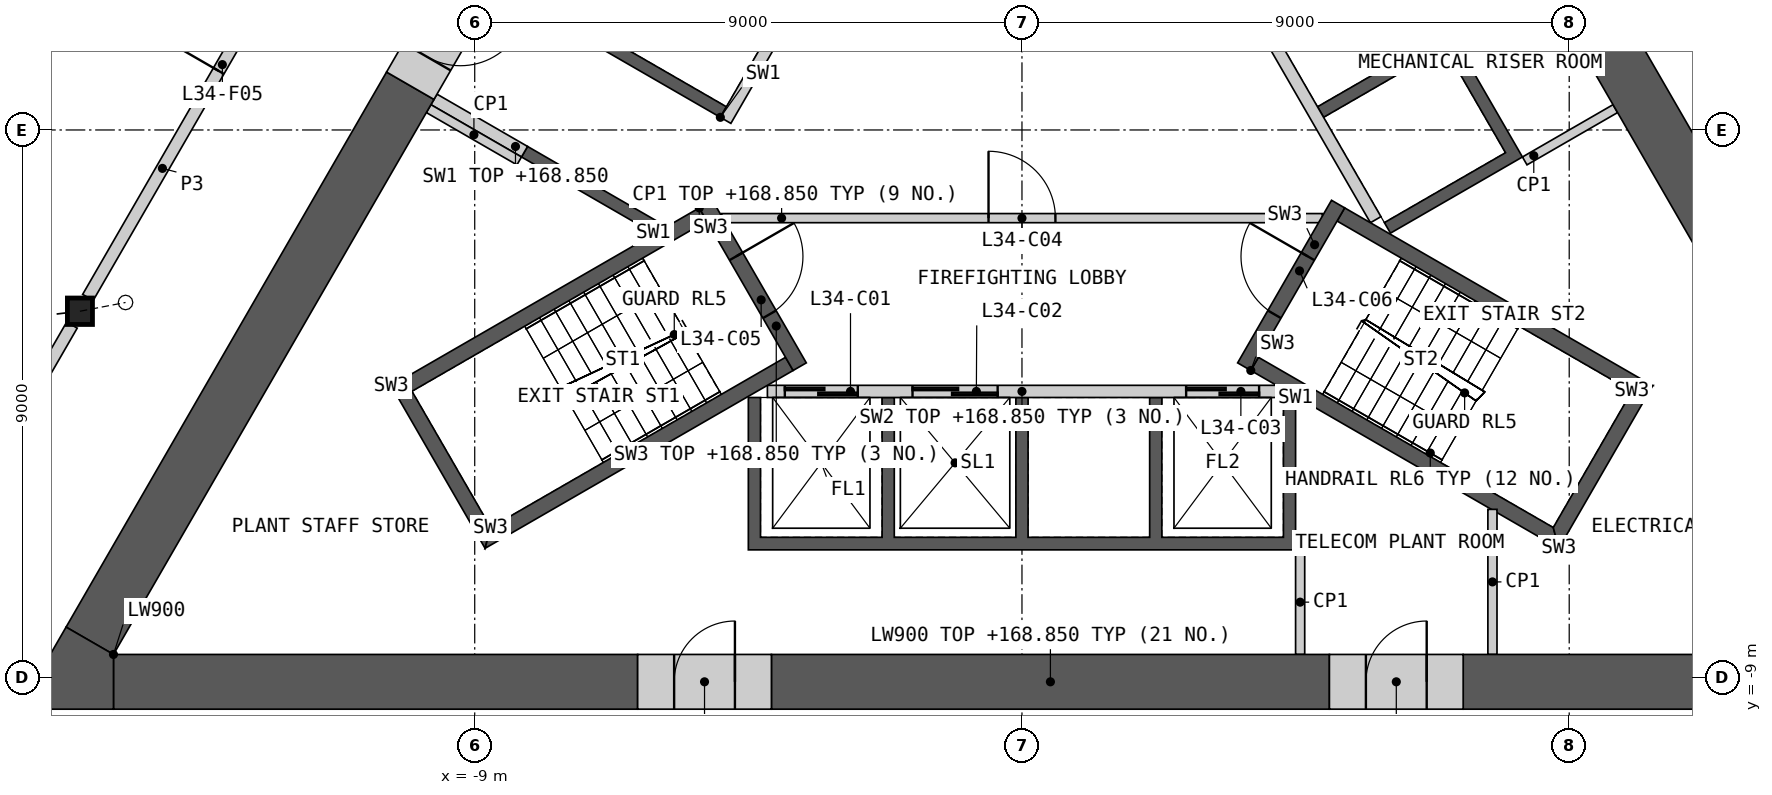
"""IFC4 building model, lengths in metres.
Left out: names, types, materials, properties, quantities, classifications, styles, units other than length and angle.
Written with IfcOpenShell. Run it as: python <this file> out.ifc"""

import sys

from ifc_helpers import new_model, si_unit, direction, frame, frame_2d, origin, origin_2d, place, context, subcontext, project, spatial, polyline, rectangle, i_section, outline, extrude, element, fill, save


model = new_model("IFC4")
c1 = context("Model", 3, precision=1e-05, world=origin(), true_north=direction((0.0, 1.0)))
c2 = subcontext(c1, "Body", "Model", "MODEL_VIEW")
j1 = project(units=[si_unit("LENGTHUNIT", "METRE"), si_unit("PLANEANGLEUNIT", "RADIAN")], contexts=[c1])
p1 = place(None, origin())
s1 = spatial("IfcSite", under=j1, at=p1, CompositionType="ELEMENT")
p2 = place(p1, origin())
s2 = spatial("IfcBuilding", under=s1, at=p2, CompositionType="ELEMENT")
p3 = place(p2, frame((0.0, 0.0, 164.2)))
s3 = spatial("IfcBuildingStorey", under=s2, at=p3, CompositionType="ELEMENT", Elevation=164.2)
p4 = place(p3, frame((-15.493, -2.982, 0.0), z_axis=(0.148279879283, 0.028574768404, 0.988532528555), x_axis=(-0.189226752312, 0.981933417401, 0.0)))
e1 = element("IfcColumn", 1, at=p4, inside=s3, PredefinedType="COLUMN", context=c2, shape_type="SweptSolid", body=[
    extrude(i_section(OverallWidth=0.412, OverallDepth=0.435, WebThickness=0.036, FlangeThickness=0.057, at=origin_2d()), frame((0.0, 0.0, 0.033)), (0.0, 0.0, 1.0), 4.992),
])
p5 = place(p3, origin())
e2 = element("IfcWall", 2, at=p5, inside=s3, PredefinedType="SHEAR", context=c2, shape_type="SweptSolid", body=[
    extrude(outline(polyline([(4.5, -4.4), (4.5, -6.906), (-4.5, -6.906), (-4.5, -4.4), (-4.3, -4.4), (-4.3, -6.7), (-2.3, -6.7), (-2.3, -4.4), (-2.1, -4.4), (-2.1, -6.7), (-0.1, -6.7), (-0.1, -4.4), (0.1, -4.4), (0.1, -6.7), (2.1, -6.7), (2.1, -4.4), (2.3, -4.4), (2.3, -6.7), (4.3, -6.7), (4.3, -4.4), (4.5, -4.4)])), origin(), (0.0, 0.0, 1.0), 4.65),
])
p6 = place(p3, frame((-4.187, -4.3, 0.0), z_axis=(0.0, 0.0, 1.0), x_axis=(1.0, 0.0, 0.0)))
e3 = element("IfcWall", 3, at=p6, inside=s3, PredefinedType="SOLIDWALL", context=c2, shape_type="SweptSolid", body=[
    extrude(rectangle(XDim=8.373, YDim=0.2, at=frame_2d((4.187, 0.0))), origin(), (0.0, 0.0, 1.0), 4.65),
])
p7 = place(p6, frame((0.287, 0.0, 0.0)))
e4 = element("IfcOpeningElement", 4, at=p7, cuts=e3, PredefinedType="OPENING", context=c2, shape_type="SweptSolid", body=[
    extrude(rectangle(XDim=1.2, YDim=2.1, at=frame_2d((0.6, 1.05))), frame((0.0, 0.11, 0.0), z_axis=(0.0, -1.0, 0.0), x_axis=(1.0, 0.0, 0.0)), (0.0, 0.0, 1.0), 0.22),
])
p8 = place(p6, frame((2.387, 0.0, 0.0)))
e5 = element("IfcOpeningElement", 5, at=p8, cuts=e3, PredefinedType="OPENING", context=c2, shape_type="SweptSolid", body=[
    extrude(rectangle(XDim=1.4, YDim=2.1, at=frame_2d((0.7, 1.05))), frame((0.0, 0.11, 0.0), z_axis=(0.0, -1.0, 0.0), x_axis=(1.0, 0.0, 0.0)), (0.0, 0.0, 1.0), 0.22),
])
p9 = place(p6, frame((6.887, 0.0, 0.0)))
e6 = element("IfcOpeningElement", 6, at=p9, cuts=e3, PredefinedType="OPENING", context=c2, shape_type="SweptSolid", body=[
    extrude(rectangle(XDim=1.2, YDim=2.1, at=frame_2d((0.6, 1.05))), frame((0.0, 0.11, 0.0), z_axis=(0.0, -1.0, 0.0), x_axis=(1.0, 0.0, 0.0)), (0.0, 0.0, 1.0), 0.22),
])
p10 = place(p3, origin())
e7 = element("IfcWall", 7, at=p10, inside=s3, PredefinedType="SHEAR", context=c2, shape_type="SweptSolid", body=[
    extrude(outline(polyline([(1.561, 6.097), (3.731, 7.35), (8.231, -0.444), (6.061, -1.697), (5.96, -1.524), (7.952, -0.374), (6.952, 1.358), (4.96, 0.208), (4.861, 0.381), (6.852, 1.531), (5.852, 3.263), (3.861, 2.113), (3.76, 2.287), (5.752, 3.437), (4.752, 5.169), (2.76, 4.019), (2.66, 4.192), (4.652, 5.342), (3.652, 7.074), (1.66, 5.924), (1.561, 6.097)])), origin(), (0.0, 0.0, 1.0), 4.65),
])
p11 = place(p3, frame((5.817, -1.476, 0.0), z_axis=(0.0, 0.0, 1.0), x_axis=(-0.500002616675, 0.866023893041, 0.0)))
e8 = element("IfcWall", 8, at=p11, inside=s3, PredefinedType="SOLIDWALL", context=c2, shape_type="SweptSolid", body=[
    extrude(rectangle(XDim=8.373, YDim=0.2, at=frame_2d((4.187, 0.0))), origin(), (0.0, 0.0, 1.0), 4.65),
])
p12 = place(p3, origin())
e9 = element("IfcWall", 9, at=p12, inside=s3, PredefinedType="SHEAR", context=c2, shape_type="SweptSolid", body=[
    extrude(outline(polyline([(-6.061, -1.697), (-8.231, -0.444), (-8.131, -0.271), (-5.96, -1.524), (-6.061, -1.697)])), origin(), (0.0, 0.0, 1.0), 4.65),
])
p13 = place(p3, origin())
e10 = element("IfcWall", 10, at=p13, inside=s3, PredefinedType="SHEAR", context=c2, shape_type="SweptSolid", body=[
    extrude(outline(polyline([(-4.96, 0.208), (-7.131, 1.461), (-3.731, 7.35), (-1.561, 6.097), (-1.66, 5.924), (-3.652, 7.074), (-4.652, 5.342), (-2.66, 4.192), (-2.76, 4.019), (-4.752, 5.169), (-5.752, 3.437), (-3.76, 2.287), (-3.861, 2.113), (-5.852, 3.263), (-6.852, 1.531), (-4.861, 0.381), (-4.96, 0.208)])), origin(), (0.0, 0.0, 1.0), 4.65),
])
p14 = place(p3, frame((-1.631, 5.776, 0.0), z_axis=(0.0, 0.0, 1.0), x_axis=(-0.499992876559, -0.866029516466, 0.0)))
e11 = element("IfcWall", 11, at=p14, inside=s3, PredefinedType="SOLIDWALL", context=c2, shape_type="SweptSolid", body=[
    extrude(rectangle(XDim=6.486, YDim=0.2, at=frame_2d((3.243, 0.0))), origin(), (0.0, 0.0, 1.0), 4.65),
])
p15 = place(p3, frame((-8.181, -0.357, 0.0), z_axis=(0.0, 0.0, 1.0), x_axis=(-0.866024871741, 0.500000921525, 0.0)))
e12 = element("IfcWall", 12, at=p15, inside=s3, PredefinedType="SHEAR", context=c2, shape_type="SweptSolid", body=[
    extrude(rectangle(XDim=1.72, YDim=0.2, at=frame_2d((0.86, 0.0))), origin(), (0.0, 0.0, 1.0), 4.65),
])
p16 = place(p3, frame((-4.941, -1.45, 0.0), z_axis=(0.0, 0.0, 1.0), x_axis=(1.0, 0.0, 0.0)))
e13 = element("IfcWall", 13, at=p16, inside=s3, PredefinedType="PARTITIONING", context=c2, shape_type="SweptSolid", body=[
    extrude(rectangle(XDim=9.882, YDim=0.15, at=frame_2d((4.941, 0.0))), origin(), (0.0, 0.0, 1.0), 4.65),
])
p17 = place(p16, frame((4.391, 0.0, 0.0)))
e14 = element("IfcOpeningElement", 14, at=p17, cuts=e13, PredefinedType="OPENING", context=c2, shape_type="SweptSolid", body=[
    extrude(rectangle(XDim=1.1, YDim=2.1, at=frame_2d((0.55, 1.05))), frame((0.0, 0.085, 0.0), z_axis=(0.0, -1.0, 0.0), x_axis=(1.0, 0.0, 0.0)), (0.0, 0.0, 1.0), 0.17),
])
p18 = place(p3, origin())
e15 = element("IfcWall", 15, at=p18, inside=s3, PredefinedType="SHEAR", context=c2, shape_type="SweptSolid", body=[
    extrude(outline(polyline([(-5.307, -1.281), (-10.374, -4.206), (-10.032, -4.298), (-5.182, -1.498), (-5.307, -1.281)])), origin(), (0.0, 0.0, 1.0), 4.65),
])
p19 = place(p3, origin())
e16 = element("IfcWall", 16, at=p19, inside=s3, PredefinedType="SHEAR", context=c2, shape_type="SweptSolid", body=[
    extrude(outline(polyline([(-10.374, -4.206), (-8.83, -6.881), (-8.738, -6.539), (-10.032, -4.298), (-10.374, -4.206)])), origin(), (0.0, 0.0, 1.0), 4.65),
])
p20 = place(p3, origin())
e17 = element("IfcWall", 17, at=p20, inside=s3, PredefinedType="SHEAR", context=c2, shape_type="SweptSolid", body=[
    extrude(outline(polyline([(-8.738, -6.539), (-8.83, -6.881), (-3.763, -3.956), (-3.888, -3.739), (-8.738, -6.539)])), origin(), (0.0, 0.0, 1.0), 4.65),
])
p21 = place(p3, frame((-5.199, -1.219, 0.0), z_axis=(0.0, 0.0, 1.0), x_axis=(0.499982516597, -0.866035497597, 0.0)))
e18 = element("IfcWall", 18, at=p21, inside=s3, PredefinedType="SHEAR", context=c2, shape_type="SweptSolid", body=[
    extrude(rectangle(XDim=3.088, YDim=0.25, at=frame_2d((1.544, 0.0))), origin(), (0.0, 0.0, 1.0), 4.65),
])
p22 = place(p21, frame((0.994, 0.0, 0.0)))
e19 = element("IfcOpeningElement", 19, at=p22, cuts=e18, PredefinedType="OPENING", context=c2, shape_type="SweptSolid", body=[
    extrude(rectangle(XDim=1.1, YDim=2.1, at=frame_2d((0.55, 1.05))), frame((0.0, 0.135, 0.0), z_axis=(0.0, -1.0, 0.0), x_axis=(1.0, 0.0, 0.0)), (0.0, 0.0, 1.0), 0.27),
])
p23 = place(p3, origin())
e20 = element("IfcWall", 20, at=p23, inside=s3, PredefinedType="SHEAR", context=c2, shape_type="SweptSolid", body=[
    extrude(outline(polyline([(3.763, -3.956), (8.83, -6.881), (8.738, -6.539), (3.888, -3.739), (3.763, -3.956)])), origin(), (0.0, 0.0, 1.0), 4.65),
])
p24 = place(p3, origin())
e21 = element("IfcWall", 21, at=p24, inside=s3, PredefinedType="SHEAR", context=c2, shape_type="SweptSolid", body=[
    extrude(outline(polyline([(8.83, -6.881), (10.374, -4.206), (10.032, -4.298), (8.738, -6.539), (8.83, -6.881)])), origin(), (0.0, 0.0, 1.0), 4.65),
])
p25 = place(p3, origin())
e22 = element("IfcWall", 22, at=p25, inside=s3, PredefinedType="SHEAR", context=c2, shape_type="SweptSolid", body=[
    extrude(outline(polyline([(10.032, -4.298), (10.374, -4.206), (5.307, -1.281), (5.182, -1.498), (10.032, -4.298)])), origin(), (0.0, 0.0, 1.0), 4.65),
])
p26 = place(p3, frame((3.655, -3.893, 0.0), z_axis=(0.0, 0.0, 1.0), x_axis=(0.499982516597, 0.866035497597, 0.0)))
e23 = element("IfcWall", 23, at=p26, inside=s3, PredefinedType="SHEAR", context=c2, shape_type="SweptSolid", body=[
    extrude(rectangle(XDim=3.088, YDim=0.25, at=frame_2d((1.544, 0.0))), origin(), (0.0, 0.0, 1.0), 4.65),
])
p27 = place(p26, frame((0.994, 0.0, 0.0)))
e24 = element("IfcOpeningElement", 24, at=p27, cuts=e23, PredefinedType="OPENING", context=c2, shape_type="SweptSolid", body=[
    extrude(rectangle(XDim=1.1, YDim=2.1, at=frame_2d((0.55, 1.05))), frame((0.0, 0.135, 0.0), z_axis=(0.0, -1.0, 0.0), x_axis=(1.0, 0.0, 0.0)), (0.0, 0.0, 1.0), 0.27),
])
for number, where, z_axis, x_axis in (
    (25, (-8.268, -0.509, 0.0), (0.0, 0.0, 1.0), (-0.866, 0.5, 0.0)),
    (26, (4.575, -6.906, 0.0), (0.0, 0.0, 1.0), (0.0, -1.0, 0.0)),
    (27, (8.268, -0.509, 0.0), (0.0, 0.0, 1.0), (0.866, 0.5, 0.0)),
):
    element("IfcWall", number, at=place(p3, frame(where, z_axis=z_axis, x_axis=x_axis)), inside=s3, PredefinedType="PARTITIONING", context=c2, shape_type="SweptSolid", body=[
        extrude(rectangle(XDim=1.72, YDim=0.15, at=frame_2d((0.86, 0.0))), origin(), (0.0, 0.0, 1.0), 4.65),
    ])
p28 = place(p3, frame((7.737, -8.626, 0.0), z_axis=(0.0, 0.0, 1.0), x_axis=(0.0, 1.0, 0.0)))
e28 = element("IfcWall", 28, at=p28, inside=s3, PredefinedType="PARTITIONING", context=c2, shape_type="SweptSolid", body=[
    extrude(rectangle(XDim=2.386, YDim=0.15, at=frame_2d((1.193, 0.0))), origin(), (0.0, 0.0, 1.0), 4.65),
])
p29 = place(p3, frame((-4.121, -9.076, 0.0), z_axis=(0.0, 0.0, 1.0), x_axis=(1.0, 0.0, 0.0)))
e29 = element("IfcWall", 29, at=p29, inside=s3, PredefinedType="SHEAR", context=c2, shape_type="SweptSolid", body=[
    extrude(rectangle(XDim=9.177, YDim=0.9, at=frame_2d((4.588, 0.0))), origin(), (0.0, 0.0, 1.0), 4.65),
])
p30 = place(p3, frame((-14.941, -9.076, 0.0), z_axis=(0.0, 0.0, 1.0), x_axis=(1.0, 0.0, 0.0)))
e30 = element("IfcWall", 30, at=p30, inside=s3, PredefinedType="SHEAR", context=c2, shape_type="SweptSolid", body=[
    extrude(rectangle(XDim=8.621, YDim=0.9, at=frame_2d((4.31, 0.0))), origin(), (0.0, 0.0, 1.0), 4.65),
])
p31 = place(p3, frame((7.256, -9.076, 0.0), z_axis=(0.0, 0.0, 1.0), x_axis=(1.0, 0.0, 0.0)))
e31 = element("IfcWall", 31, at=p31, inside=s3, PredefinedType="SHEAR", context=c2, shape_type="SweptSolid", body=[
    extrude(rectangle(XDim=7.685, YDim=0.9, at=frame_2d((3.843, 0.0))), origin(), (0.0, 0.0, 1.0), 4.65),
])
p32 = place(p3, frame((12.208, -2.992, 0.0), z_axis=(0.0, 0.0, 1.0), x_axis=(-0.499993658486, 0.866029065029, 0.0)))
e32 = element("IfcWall", 32, at=p32, inside=s3, PredefinedType="SHEAR", context=c2, shape_type="SweptSolid", body=[
    extrude(rectangle(XDim=5.974, YDim=0.9, at=frame_2d((2.987, 0.0))), origin(), (0.0, 0.0, 1.0), 4.65),
])
p33 = place(p3, frame((-10.06, 0.728, 0.0), z_axis=(0.0, 0.0, 1.0), x_axis=(-0.499995114243, -0.866028224559, 0.0)))
e33 = element("IfcWall", 33, at=p33, inside=s3, PredefinedType="SHEAR", context=c2, shape_type="SweptSolid", body=[
    extrude(rectangle(XDim=10.541, YDim=0.9, at=frame_2d((5.271, 0.0))), origin(), (0.0, 0.0, 1.0), 4.65),
])
p34 = place(p3, origin())
e34 = element("IfcWall", 34, at=p34, inside=s3, PredefinedType="SHEAR", context=c2, shape_type="SweptSolid", body=[
    extrude(outline(polyline([(-14.941, -8.626), (-14.941, -9.526), (-16.5, -9.526), (-15.721, -8.176), (-14.941, -8.626)])), origin(), (0.0, 0.0, 1.0), 4.65),
])
p35 = place(p3, frame((5.056, -9.076, 0.0), z_axis=(0.0, 0.0, 1.0), x_axis=(1.0, 0.0, 0.0)))
e35 = element("IfcWall", 35, at=p35, inside=s3, PredefinedType="SHEAR", context=c2, shape_type="SweptSolid", body=[
    extrude(rectangle(XDim=2.2, YDim=0.9, at=frame_2d((1.1, 0.0))), origin(), (0.0, 0.0, 1.0), 4.65),
])
p36 = place(p35, frame((0.6, 0.0, 0.0)))
e36 = element("IfcOpeningElement", 36, at=p36, cuts=e35, PredefinedType="OPENING", context=c2, shape_type="SweptSolid", body=[
    extrude(rectangle(XDim=1.0, YDim=2.1, at=frame_2d((0.5, 1.05))), frame((0.0, 0.46, 0.0), z_axis=(0.0, -1.0, 0.0), x_axis=(1.0, 0.0, 0.0)), (0.0, 0.0, 1.0), 0.92),
])
p37 = place(p3, frame((-6.321, -9.076, 0.0), z_axis=(0.0, 0.0, 1.0), x_axis=(1.0, 0.0, 0.0)))
e37 = element("IfcWall", 37, at=p37, inside=s3, PredefinedType="SHEAR", context=c2, shape_type="SweptSolid", body=[
    extrude(rectangle(XDim=2.2, YDim=0.9, at=frame_2d((1.1, 0.0))), origin(), (0.0, 0.0, 1.0), 4.65),
])
p38 = place(p37, frame((0.6, 0.0, 0.0)))
e38 = element("IfcOpeningElement", 38, at=p38, cuts=e37, PredefinedType="OPENING", context=c2, shape_type="SweptSolid", body=[
    extrude(rectangle(XDim=1.0, YDim=2.1, at=frame_2d((0.5, 1.05))), frame((0.0, 0.46, 0.0), z_axis=(0.0, -1.0, 0.0), x_axis=(1.0, 0.0, 0.0)), (0.0, 0.0, 1.0), 0.92),
])
p39 = place(p3, frame((-8.96, 2.633, 0.0), z_axis=(0.0, 0.0, 1.0), x_axis=(-0.50002983664, -0.866008176907, 0.0)))
e39 = element("IfcWall", 39, at=p39, inside=s3, PredefinedType="SHEAR", context=c2, shape_type="SweptSolid", body=[
    extrude(rectangle(XDim=2.2, YDim=0.9, at=frame_2d((1.1, 0.0))), origin(), (0.0, 0.0, 1.0), 4.65),
])
p40 = place(p39, frame((0.55, 0.0, 0.0)))
e40 = element("IfcOpeningElement", 40, at=p40, cuts=e39, PredefinedType="OPENING", context=c2, shape_type="SweptSolid", body=[
    extrude(rectangle(XDim=1.1, YDim=2.1, at=frame_2d((0.55, 1.05))), frame((0.0, 0.46, 0.0), z_axis=(0.0, -1.0, 0.0), x_axis=(1.0, 0.0, 0.0)), (0.0, 0.0, 1.0), 0.92),
])
p41 = place(p3, frame((-15.361, -2.754, 0.0), z_axis=(0.0, 0.0, 1.0), x_axis=(0.500004141693, 0.866023012564, 0.0)))
e41 = element("IfcWall", 41, at=p41, inside=s3, PredefinedType="PARTITIONING", context=c2, shape_type="SweptSolid", body=[
    extrude(rectangle(XDim=9.803, YDim=0.2, at=frame_2d((4.902, 0.0))), origin(), (0.0, 0.0, 1.0), 4.65),
])
p42 = place(p41, frame((4.302, 0.0, 0.0)))
e42 = element("IfcOpeningElement", 42, at=p42, cuts=e41, PredefinedType="OPENING", context=c2, shape_type="SweptSolid", body=[
    extrude(rectangle(XDim=1.2, YDim=2.1, at=frame_2d((0.6, 1.05))), frame((0.0, 0.11, 0.0), z_axis=(0.0, -1.0, 0.0), x_axis=(1.0, 0.0, 0.0)), (0.0, 0.0, 1.0), 0.22),
])
p43 = place(p3, frame((10.46, 5.736, 0.0), z_axis=(0.0, 0.0, 1.0), x_axis=(0.500004141693, -0.866023012564, 0.0)))
e43 = element("IfcWall", 43, at=p43, inside=s3, PredefinedType="PARTITIONING", context=c2, shape_type="SweptSolid", body=[
    extrude(rectangle(XDim=9.803, YDim=0.2, at=frame_2d((4.902, 0.0))), origin(), (0.0, 0.0, 1.0), 4.65),
])
p44 = place(p43, frame((4.302, 0.0, 0.0)))
e44 = element("IfcOpeningElement", 44, at=p44, cuts=e43, PredefinedType="OPENING", context=c2, shape_type="SweptSolid", body=[
    extrude(rectangle(XDim=1.2, YDim=2.1, at=frame_2d((0.6, 1.05))), frame((0.0, 0.11, 0.0), z_axis=(0.0, -1.0, 0.0), x_axis=(1.0, 0.0, 0.0)), (0.0, 0.0, 1.0), 0.22),
])
p45 = place(p3, frame((-18.744, -8.613, 0.0), z_axis=(0.0, 0.0, 1.0), x_axis=(0.499997920671, 0.866026604282, 0.0)))
e45 = element("IfcWall", 45, at=p45, inside=s3, PredefinedType="PARTITIONING", context=c2, shape_type="SweptSolid", body=[
    extrude(rectangle(XDim=6.24, YDim=0.2, at=frame_2d((3.12, 0.0))), origin(), (0.0, 0.0, 1.0), 4.65),
])
p46 = place(p7, origin())
e46 = element("IfcDoor", 46, at=p46, inside=s3, OperationType="SLIDING_TO_LEFT", PredefinedType="DOOR", context=c2, shape_type="SweptSolid", body=[
    extrude(rectangle(XDim=1.2, YDim=2.1, at=frame_2d((0.6, 1.05))), frame((0.0, 0.025, 0.0), z_axis=(0.0, -1.0, 0.0), x_axis=(1.0, 0.0, 0.0)), (0.0, 0.0, 1.0), 0.05),
])
fill(e4, e46)
p47 = place(p8, origin())
e47 = element("IfcDoor", 47, at=p47, inside=s3, OperationType="SLIDING_TO_LEFT", PredefinedType="DOOR", context=c2, shape_type="SweptSolid", body=[
    extrude(rectangle(XDim=1.4, YDim=2.1, at=frame_2d((0.7, 1.05))), frame((0.0, 0.025, 0.0), z_axis=(0.0, -1.0, 0.0), x_axis=(1.0, 0.0, 0.0)), (0.0, 0.0, 1.0), 0.05),
])
fill(e5, e47)
p48 = place(p9, origin())
e48 = element("IfcDoor", 48, at=p48, inside=s3, OperationType="SLIDING_TO_LEFT", PredefinedType="DOOR", context=c2, shape_type="SweptSolid", body=[
    extrude(rectangle(XDim=1.2, YDim=2.1, at=frame_2d((0.6, 1.05))), frame((0.0, 0.025, 0.0), z_axis=(0.0, -1.0, 0.0), x_axis=(1.0, 0.0, 0.0)), (0.0, 0.0, 1.0), 0.05),
])
fill(e6, e48)
p49 = place(p17, origin())
e49 = element("IfcDoor", 49, at=p49, inside=s3, OperationType="SINGLE_SWING_LEFT", PredefinedType="DOOR", context=c2, shape_type="SweptSolid", body=[
    extrude(rectangle(XDim=1.1, YDim=2.1, at=frame_2d((0.55, 1.05))), frame((0.0, 0.025, 0.0), z_axis=(0.0, -1.0, 0.0), x_axis=(1.0, 0.0, 0.0)), (0.0, 0.0, 1.0), 0.05),
])
fill(e14, e49)
p50 = place(p22, origin())
e50 = element("IfcDoor", 50, at=p50, inside=s3, OperationType="SINGLE_SWING_LEFT", PredefinedType="DOOR", context=c2, shape_type="SweptSolid", body=[
    extrude(rectangle(XDim=1.1, YDim=2.1, at=frame_2d((0.55, 1.05))), frame((0.0, 0.025, 0.0), z_axis=(0.0, -1.0, 0.0), x_axis=(1.0, 0.0, 0.0)), (0.0, 0.0, 1.0), 0.05),
])
fill(e19, e50)
p51 = place(p27, origin())
e51 = element("IfcDoor", 51, at=p51, inside=s3, OperationType="SINGLE_SWING_RIGHT", PredefinedType="DOOR", context=c2, shape_type="SweptSolid", body=[
    extrude(rectangle(XDim=1.1, YDim=2.1, at=frame_2d((0.55, 1.05))), frame((0.0, 0.025, 0.0), z_axis=(0.0, -1.0, 0.0), x_axis=(1.0, 0.0, 0.0)), (0.0, 0.0, 1.0), 0.05),
])
fill(e24, e51)
p52 = place(p36, origin())
e52 = element("IfcDoor", 52, at=p52, inside=s3, OperationType="SINGLE_SWING_RIGHT", PredefinedType="DOOR", context=c2, shape_type="SweptSolid", body=[
    extrude(rectangle(XDim=1.0, YDim=2.1, at=frame_2d((0.5, 1.05))), frame((0.0, 0.205, 0.0), z_axis=(0.0, -1.0, 0.0), x_axis=(1.0, 0.0, 0.0)), (0.0, 0.0, 1.0), 0.05),
])
fill(e36, e52)
p53 = place(p38, origin())
e53 = element("IfcDoor", 53, at=p53, inside=s3, OperationType="SINGLE_SWING_RIGHT", PredefinedType="DOOR", context=c2, shape_type="SweptSolid", body=[
    extrude(rectangle(XDim=1.0, YDim=2.1, at=frame_2d((0.5, 1.05))), frame((0.0, 0.205, 0.0), z_axis=(0.0, -1.0, 0.0), x_axis=(1.0, 0.0, 0.0)), (0.0, 0.0, 1.0), 0.05),
])
fill(e38, e53)
p54 = place(p40, origin())
e54 = element("IfcDoor", 54, at=p54, inside=s3, OperationType="SINGLE_SWING_LEFT", PredefinedType="DOOR", context=c2, shape_type="SweptSolid", body=[
    extrude(rectangle(XDim=1.1, YDim=2.1, at=frame_2d((0.55, 1.05))), frame((0.0, 0.205, 0.0), z_axis=(0.0, -1.0, 0.0), x_axis=(1.0, 0.0, 0.0)), (0.0, 0.0, 1.0), 0.05),
])
fill(e40, e54)
p55 = place(p42, origin())
e55 = element("IfcDoor", 55, at=p55, inside=s3, OperationType="SINGLE_SWING_LEFT", PredefinedType="DOOR", context=c2, shape_type="SweptSolid", body=[
    extrude(rectangle(XDim=1.2, YDim=2.1, at=frame_2d((0.6, 1.05))), frame((0.0, 0.025, 0.0), z_axis=(0.0, -1.0, 0.0), x_axis=(1.0, 0.0, 0.0)), (0.0, 0.0, 1.0), 0.05),
])
fill(e42, e55)
save(model, sys.argv[1])
